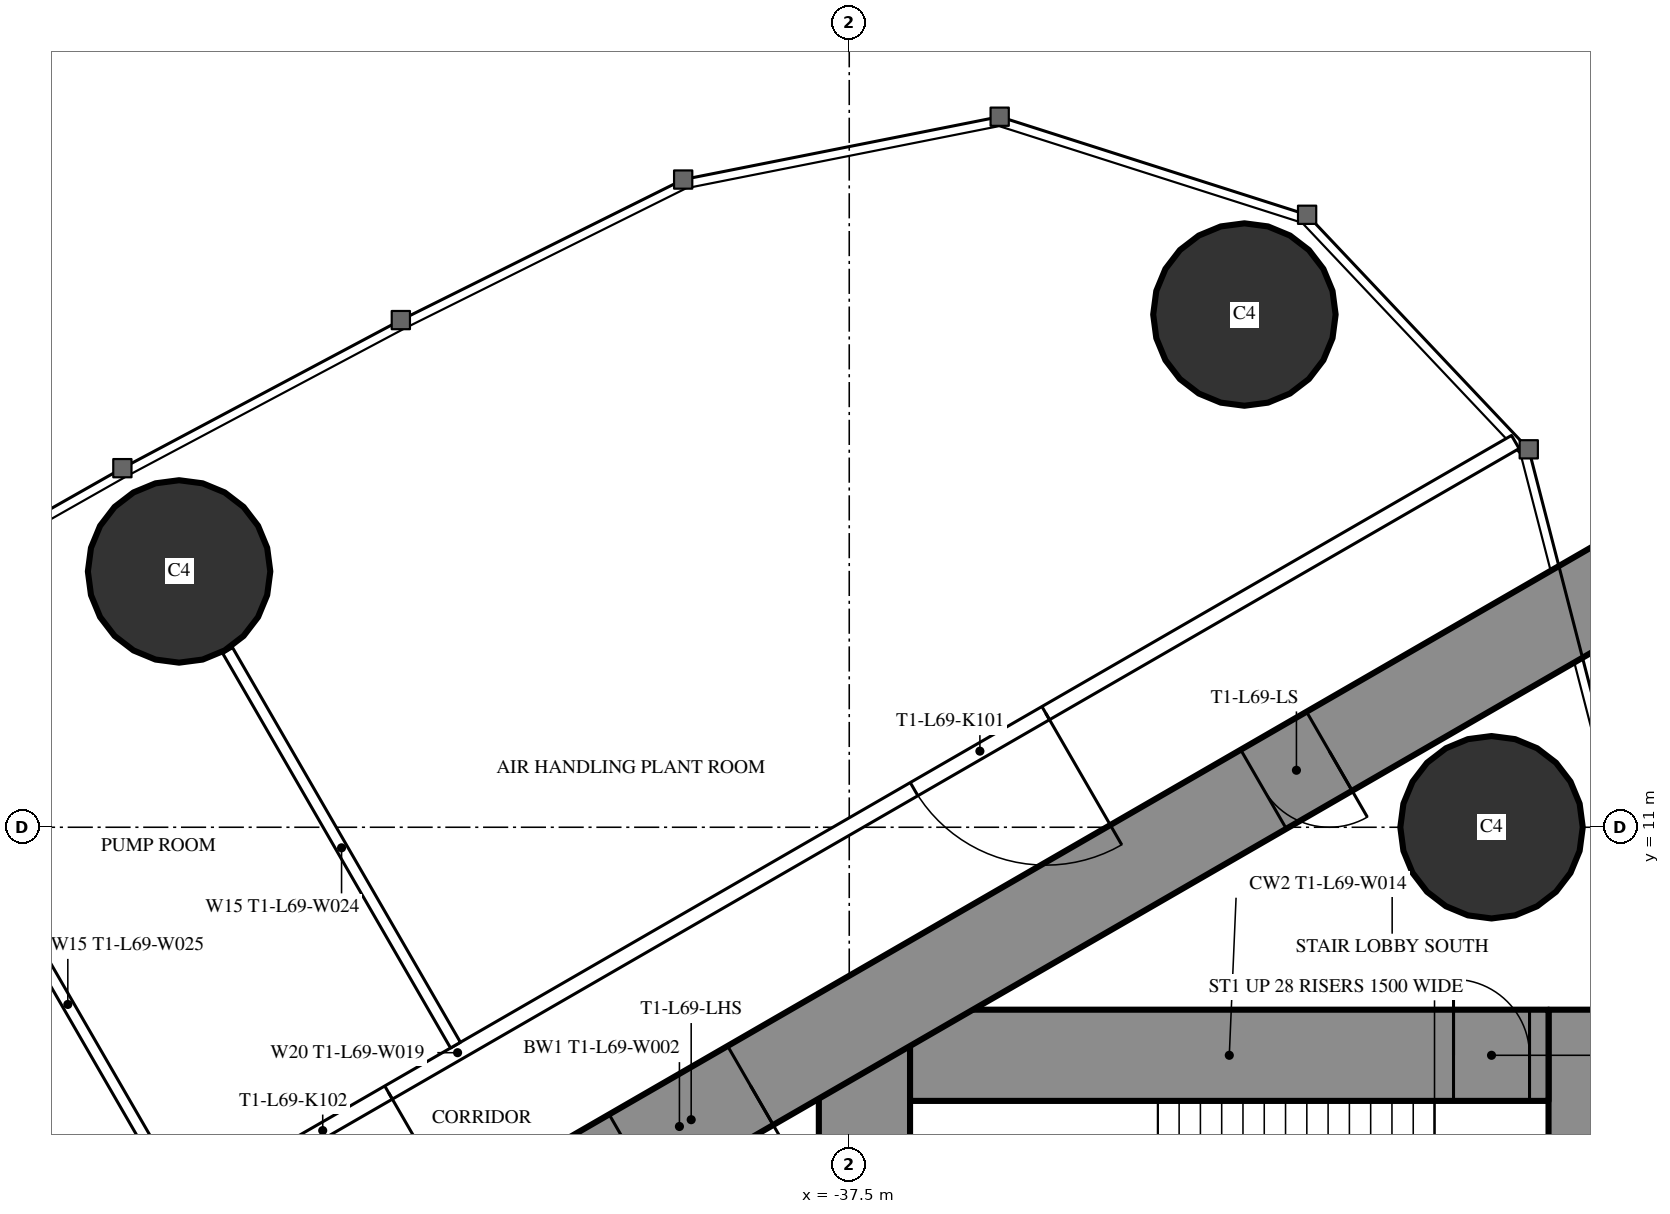
"""IFC4 building model, lengths in metres.
Left out: names, types, materials, properties, quantities, classifications, styles, units other than length and angle.
Written with IfcOpenShell. Run it as: python <this file> out.ifc"""

import sys

from ifc_helpers import new_model, si_unit, direction, frame, frame_2d, origin, origin_2d, place, context, subcontext, project, spatial, rectangle, circle, extrude, element, fill, save


model = new_model("IFC4")
c1 = context("Model", 3, precision=1e-05, world=origin(), true_north=direction((0.0, 1.0)))
c2 = subcontext(c1, "Body", "Model", "MODEL_VIEW")
j1 = project(units=[si_unit("LENGTHUNIT", "METRE"), si_unit("PLANEANGLEUNIT", "RADIAN")], contexts=[c1])
p1 = place(None, origin())
s1 = spatial("IfcSite", under=j1, at=p1, CompositionType="ELEMENT")
p2 = place(p1, origin())
s2 = spatial("IfcBuilding", under=s1, at=p2, CompositionType="ELEMENT")
p3 = place(p2, frame((0.0, 0.0, 263.3)))
s3 = spatial("IfcBuildingStorey", under=s2, at=p3, CompositionType="ELEMENT", Elevation=263.3)
for number, where, z_axis, x_axis in (
    (1, (-32.301, 17.745, 0.0), (0.0, 0.0, 1.0), (1.0, 0.0, 0.0)),
    (2, (-29.05, 11.0, 0.0), (0.0, 0.0, 1.0), (1.0, 0.0, 0.0)),
    (3, (-46.317, 14.365, 0.0), (0.0, 0.0, 1.0), (1.0, 0.0, 0.0)),
):
    element("IfcColumn", number, at=place(p3, frame(where, z_axis=z_axis, x_axis=x_axis)), inside=s3, PredefinedType="COLUMN", context=c2, shape_type="SweptSolid", body=[
        extrude(circle(Radius=1.2, at=origin_2d()), origin(), (0.0, 0.0, 1.0), 5.0),
    ])
p4 = place(p3, frame((-27.9, 8.6, 0.0), z_axis=(0.0, 0.0, 1.0), x_axis=(0.0, -1.0, 0.0)))
e4 = element("IfcWall", 4, at=p4, inside=s3, PredefinedType="SHEAR", context=c2, shape_type="SweptSolid", body=[
    extrude(rectangle(XDim=17.2, YDim=0.8, at=frame_2d((8.6, 0.0))), origin(), (0.0, 0.0, 1.0), 5.0),
])
p5 = place(p4, frame((6.95, 0.0, 0.0)))
e5 = element("IfcOpeningElement", 5, at=p5, cuts=e4, PredefinedType="OPENING", context=c2, shape_type="SweptSolid", body=[
    extrude(rectangle(XDim=0.9, YDim=2.2, at=frame_2d((0.45, 1.1))), frame((0.0, 0.41, 0.0), z_axis=(0.0, -1.0, 0.0), x_axis=(1.0, 0.0, 0.0)), (0.0, 0.0, 1.0), 0.82),
])
p6 = place(p3, frame((-37.3, 8.6, 0.0), z_axis=(0.0, 0.0, 1.0), x_axis=(0.0, -1.0, 0.0)))
e6 = element("IfcWall", 6, at=p6, inside=s3, PredefinedType="SHEAR", context=c2, shape_type="SweptSolid", body=[
    extrude(rectangle(XDim=17.2, YDim=1.2, at=frame_2d((8.6, 0.0))), origin(), (0.0, 0.0, 1.0), 5.0),
])
p7 = place(p6, frame((7.7, 0.0, 0.0)))
e7 = element("IfcOpeningElement", 7, at=p7, cuts=e6, PredefinedType="OPENING", context=c2, shape_type="SweptSolid", body=[
    extrude(rectangle(XDim=1.8, YDim=2.2, at=frame_2d((0.9, 1.1))), frame((0.0, 0.61, 0.0), z_axis=(0.0, -1.0, 0.0), x_axis=(1.0, 0.0, 0.0)), (0.0, 0.0, 1.0), 1.22),
])
p8 = place(p3, frame((-28.3, 8.0, 0.0), z_axis=(0.0, 0.0, 1.0), x_axis=(-1.0, 0.0, 0.0)))
e8 = element("IfcWall", 8, at=p8, inside=s3, PredefinedType="SHEAR", context=c2, shape_type="SweptSolid", body=[
    extrude(rectangle(XDim=8.4, YDim=1.2, at=frame_2d((4.2, 0.0))), origin(), (0.0, 0.0, 1.0), 5.0),
])
p9 = place(p8, frame((0.25, 0.0, 0.0)))
e9 = element("IfcOpeningElement", 9, at=p9, cuts=e8, PredefinedType="OPENING", context=c2, shape_type="SweptSolid", body=[
    extrude(rectangle(XDim=1.0, YDim=2.2, at=frame_2d((0.5, 1.1))), frame((0.0, 0.61, 0.0), z_axis=(0.0, -1.0, 0.0), x_axis=(1.0, 0.0, 0.0)), (0.0, 0.0, 1.0), 1.22),
])
p10 = place(p3, frame((-27.2, 14.3, 0.0), z_axis=(0.0, 0.0, 1.0), x_axis=(-0.866026593062, -0.499997940104, 0.0)))
e10 = element("IfcWall", 10, at=p10, inside=s3, PredefinedType="SHEAR", context=c2, shape_type="SweptSolid", body=[
    extrude(rectangle(XDim=28.946, YDim=1.2, at=frame_2d((14.473, 0.0))), origin(), (0.0, 0.0, 1.0), 5.0),
])
p11 = place(p10, frame((4.6, 0.0, 0.0)))
e11 = element("IfcOpeningElement", 11, at=p11, cuts=e10, PredefinedType="OPENING", context=c2, shape_type="SweptSolid", body=[
    extrude(rectangle(XDim=1.0, YDim=2.2, at=frame_2d((0.5, 1.1))), frame((0.0, 0.61, 0.0), z_axis=(0.0, -1.0, 0.0), x_axis=(1.0, 0.0, 0.0)), (0.0, 0.0, 1.0), 1.22),
])
p12 = place(p10, frame((13.395, 0.0, 0.0)))
e12 = element("IfcOpeningElement", 12, at=p12, cuts=e10, PredefinedType="OPENING", context=c2, shape_type="SweptSolid", body=[
    extrude(rectangle(XDim=1.8, YDim=2.2, at=frame_2d((0.9, 1.1))), frame((0.0, 0.61, 0.0), z_axis=(0.0, -1.0, 0.0), x_axis=(1.0, 0.0, 0.0)), (0.0, 0.0, 1.0), 1.22),
])
p13 = place(p3, frame((-28.737, 16.068, 0.0), z_axis=(0.0, 0.0, 1.0), x_axis=(-0.866026057212, -0.499998868229, 0.0)))
e13 = element("IfcWall", 13, at=p13, inside=s3, PredefinedType="PARTITIONING", context=c2, shape_type="SweptSolid", body=[
    extrude(rectangle(XDim=32.137, YDim=0.2, at=frame_2d((16.068, 0.0))), origin(), (0.0, 0.0, 1.0), 4.75),
])
p14 = place(p13, frame((7.134, 0.0, 0.0)))
e14 = element("IfcOpeningElement", 14, at=p14, cuts=e13, PredefinedType="OPENING", context=c2, shape_type="SweptSolid", body=[
    extrude(rectangle(XDim=2.0, YDim=2.4, at=frame_2d((1.0, 1.2))), frame((0.0, 0.11, 0.0), z_axis=(0.0, -1.0, 0.0), x_axis=(1.0, 0.0, 0.0)), (0.0, 0.0, 1.0), 0.22),
])
p15 = place(p13, frame((17.117, 0.0, 0.0)))
e15 = element("IfcOpeningElement", 15, at=p15, cuts=e13, PredefinedType="OPENING", context=c2, shape_type="SweptSolid", body=[
    extrude(rectangle(XDim=2.0, YDim=2.4, at=frame_2d((1.0, 1.2))), frame((0.0, 0.11, 0.0), z_axis=(0.0, -1.0, 0.0), x_axis=(1.0, 0.0, 0.0)), (0.0, 0.0, 1.0), 0.22),
])
p16 = place(p13, frame((21.266, 0.0, 0.0)))
e16 = element("IfcOpeningElement", 16, at=p16, cuts=e13, PredefinedType="OPENING", context=c2, shape_type="SweptSolid", body=[
    extrude(rectangle(XDim=2.0, YDim=2.4, at=frame_2d((1.0, 1.2))), frame((0.0, 0.11, 0.0), z_axis=(0.0, -1.0, 0.0), x_axis=(1.0, 0.0, 0.0)), (0.0, 0.0, 1.0), 0.22),
])
p17 = place(p13, frame((27.126, 0.0, 0.0)))
e17 = element("IfcOpeningElement", 17, at=p17, cuts=e13, PredefinedType="OPENING", context=c2, shape_type="SweptSolid", body=[
    extrude(rectangle(XDim=2.0, YDim=2.4, at=frame_2d((1.0, 1.2))), frame((0.0, 0.11, 0.0), z_axis=(0.0, -1.0, 0.0), x_axis=(1.0, 0.0, 0.0)), (0.0, 0.0, 1.0), 0.22),
])
p18 = place(p3, frame((-42.68, 8.134, 0.0), z_axis=(0.0, 0.0, 1.0), x_axis=(-0.499984479505, 0.866034364361, 0.0)))
e18 = element("IfcWall", 18, at=p18, inside=s3, PredefinedType="PARTITIONING", context=c2, shape_type="SweptSolid", body=[
    extrude(rectangle(XDim=5.995, YDim=0.15, at=frame_2d((2.998, 0.0))), origin(), (0.0, 0.0, 1.0), 3.85),
])
p19 = place(p3, frame((-46.274, 6.059, 0.0), z_axis=(0.0, 0.0, 1.0), x_axis=(-0.500020471368, 0.866013584312, 0.0)))
e19 = element("IfcWall", 19, at=p19, inside=s3, PredefinedType="PARTITIONING", context=c2, shape_type="SweptSolid", body=[
    extrude(rectangle(XDim=6.028, YDim=0.15, at=frame_2d((3.014, 0.0))), origin(), (0.0, 0.0, 1.0), 3.85),
])
p20 = place(p14, origin())
e20 = element("IfcDoor", 20, at=p20, inside=s3, OperationType="DOUBLE_DOOR_SINGLE_SWING", PredefinedType="DOOR", context=c2, shape_type="SweptSolid", body=[
    extrude(rectangle(XDim=2.0, YDim=2.4, at=frame_2d((1.0, 1.2))), frame((0.0, 0.025, 0.0), z_axis=(0.0, -1.0, 0.0), x_axis=(1.0, 0.0, 0.0)), (0.0, 0.0, 1.0), 0.05),
])
fill(e14, e20)
p21 = place(p15, origin())
e21 = element("IfcDoor", 21, at=p21, inside=s3, OperationType="DOUBLE_DOOR_SINGLE_SWING", PredefinedType="DOOR", context=c2, shape_type="SweptSolid", body=[
    extrude(rectangle(XDim=2.0, YDim=2.4, at=frame_2d((1.0, 1.2))), frame((0.0, 0.025, 0.0), z_axis=(0.0, -1.0, 0.0), x_axis=(1.0, 0.0, 0.0)), (0.0, 0.0, 1.0), 0.05),
])
fill(e15, e21)
p22 = place(p11, origin())
e22 = element("IfcDoor", 22, at=p22, inside=s3, OperationType="SINGLE_SWING_LEFT", PredefinedType="DOOR", context=c2, shape_type="SweptSolid", body=[
    extrude(rectangle(XDim=1.0, YDim=2.2, at=frame_2d((0.5, 1.1))), frame((0.0, 0.025, 0.0), z_axis=(0.0, -1.0, 0.0), x_axis=(1.0, 0.0, 0.0)), (0.0, 0.0, 1.0), 0.05),
])
fill(e11, e22)
p23 = place(p12, origin())
e23 = element("IfcDoor", 23, at=p23, inside=s3, OperationType="DOUBLE_DOOR_SINGLE_SWING", PredefinedType="DOOR", context=c2, shape_type="SweptSolid", body=[
    extrude(rectangle(XDim=1.8, YDim=2.2, at=frame_2d((0.9, 1.1))), frame((0.0, 0.025, 0.0), z_axis=(0.0, -1.0, 0.0), x_axis=(1.0, 0.0, 0.0)), (0.0, 0.0, 1.0), 0.05),
])
fill(e12, e23)
p24 = place(p9, origin())
e24 = element("IfcDoor", 24, at=p24, inside=s3, OperationType="SINGLE_SWING_RIGHT", PredefinedType="DOOR", context=c2, shape_type="SweptSolid", body=[
    extrude(rectangle(XDim=1.0, YDim=2.2, at=frame_2d((0.5, 1.1))), frame((0.0, 0.025, 0.0), z_axis=(0.0, -1.0, 0.0), x_axis=(1.0, 0.0, 0.0)), (0.0, 0.0, 1.0), 0.05),
])
fill(e9, e24)
save(model, sys.argv[1])
